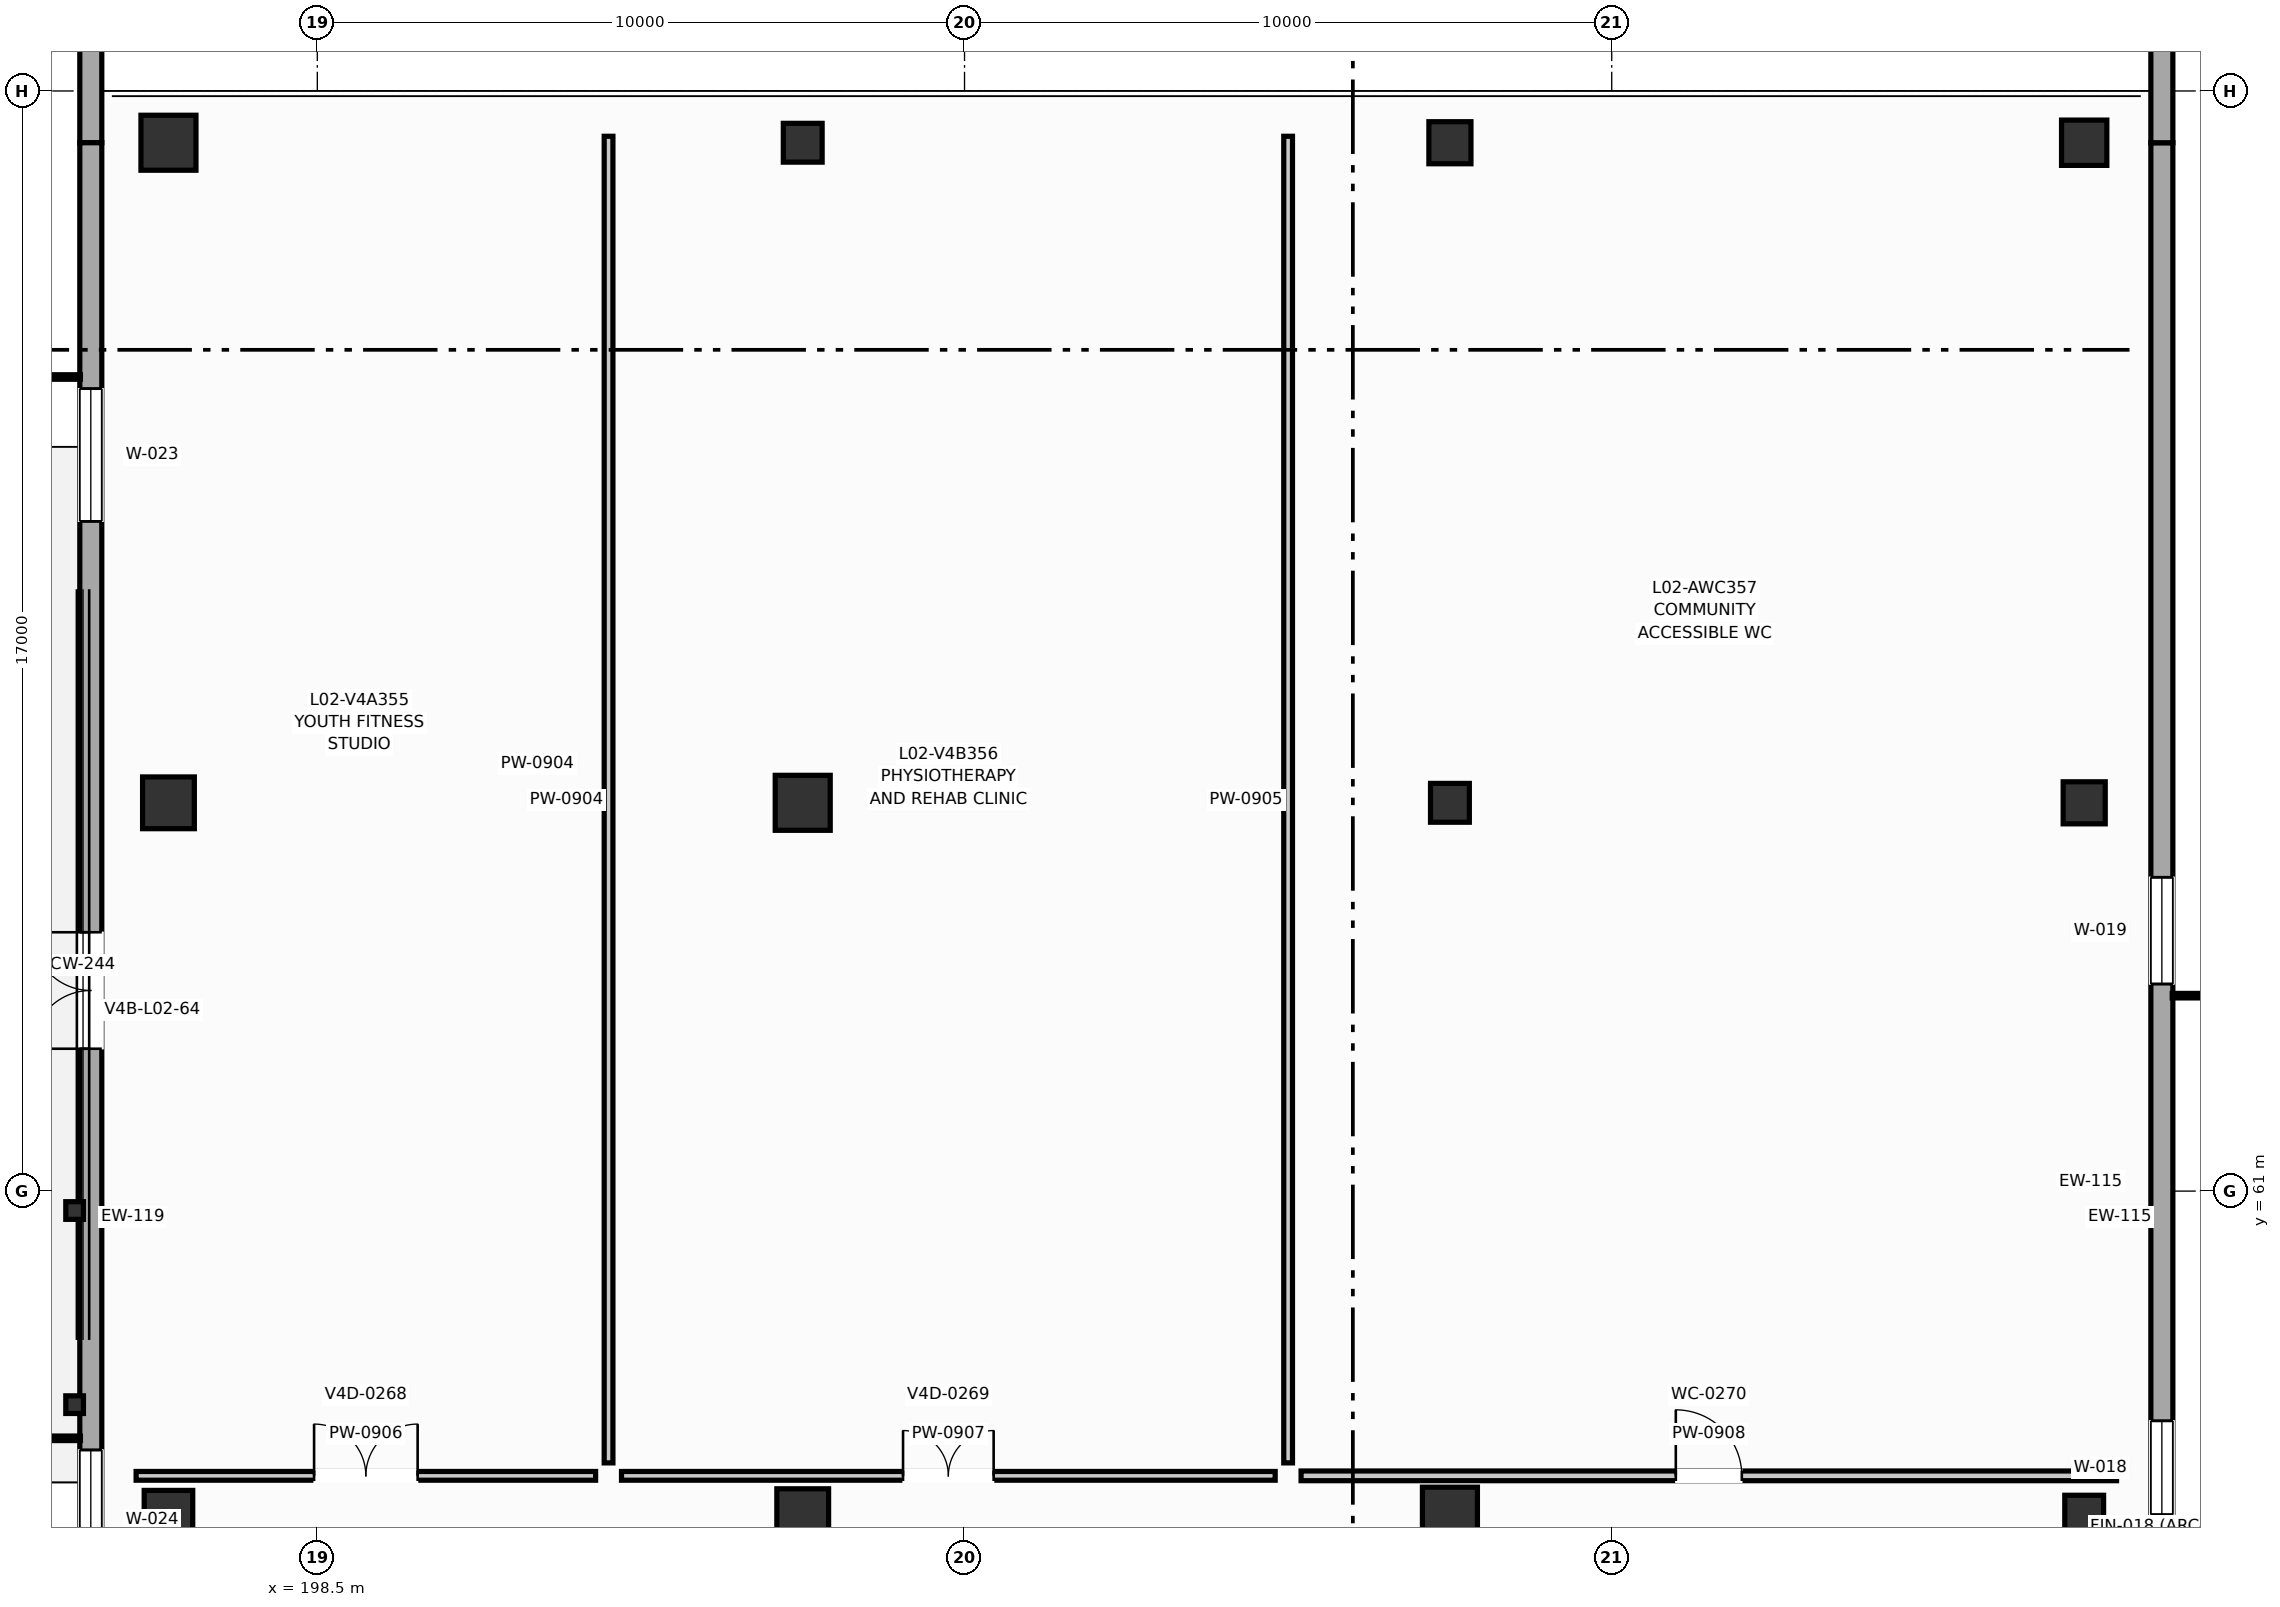
"""IFC4 building model, lengths in metres.
Left out: names, types, materials, properties, quantities, classifications, styles, units other than length and angle.
Written with IfcOpenShell. Run it as: python <this file> out.ifc"""

import sys

from ifc_helpers import new_model, si_unit, direction, frame, frame_2d, origin, origin_2d, place, context, subcontext, project, spatial, rectangle, hollow_circle, extrude, element, fill, save


model = new_model("IFC4")
c1 = context("Model", 3, precision=1e-05, world=origin(), true_north=direction((0.0, 1.0)))
c2 = subcontext(c1, "Body", "Model", "MODEL_VIEW")
j1 = project(units=[si_unit("LENGTHUNIT", "METRE"), si_unit("PLANEANGLEUNIT", "RADIAN")], contexts=[c1])
p1 = place(None, origin())
s1 = spatial("IfcSite", under=j1, at=p1, CompositionType="ELEMENT")
p2 = place(p1, origin())
s2 = spatial("IfcBuilding", under=s1, at=p2, CompositionType="ELEMENT")
p3 = place(p2, frame((0.0, 0.0, 9.0)))
s3 = spatial("IfcBuildingStorey", under=s2, at=p3, CompositionType="ELEMENT", Elevation=9.0)
p4 = place(p3, frame((196.2, 56.0, 0.0), z_axis=(0.0, 0.0, 1.0), x_axis=(1.0, 0.0, 0.0)))
e1 = element("IfcColumn", 1, at=p4, inside=s3, PredefinedType="COLUMN", context=c2, shape_type="SweptSolid", body=[
    extrude(rectangle(XDim=0.75, YDim=0.75, at=origin_2d()), origin(), (0.0, 0.0, 1.0), 4.5),
])
p5 = place(p3, frame((196.2, 67.0, 0.0), z_axis=(0.0, 0.0, 1.0), x_axis=(1.0, 0.0, 0.0)))
e2 = element("IfcColumn", 2, at=p5, inside=s3, PredefinedType="COLUMN", context=c2, shape_type="SweptSolid", body=[
    extrude(rectangle(XDim=0.8, YDim=0.8, at=origin_2d()), origin(), (0.0, 0.0, 1.0), 4.5),
])
p6 = place(p3, frame((196.2, 77.2, 0.0), z_axis=(0.0, 0.0, 1.0), x_axis=(1.0, 0.0, 0.0)))
e3 = element("IfcColumn", 3, at=p6, inside=s3, PredefinedType="COLUMN", context=c2, shape_type="SweptSolid", body=[
    extrude(rectangle(XDim=0.85, YDim=0.85, at=origin_2d()), origin(), (0.0, 0.0, 1.0), 4.5),
])
p7 = place(p3, frame((206.0, 56.0, 0.0), z_axis=(0.0, 0.0, 1.0), x_axis=(1.0, 0.0, 0.0)))
e4 = element("IfcColumn", 4, at=p7, inside=s3, PredefinedType="COLUMN", context=c2, shape_type="SweptSolid", body=[
    extrude(rectangle(XDim=0.8, YDim=0.8, at=origin_2d()), origin(), (0.0, 0.0, 1.0), 4.5),
])
p8 = place(p3, frame((206.0, 67.0, 0.0), z_axis=(0.0, 0.0, 1.0), x_axis=(1.0, 0.0, 0.0)))
e5 = element("IfcColumn", 5, at=p8, inside=s3, PredefinedType="COLUMN", context=c2, shape_type="SweptSolid", body=[
    extrude(rectangle(XDim=0.85, YDim=0.85, at=origin_2d()), origin(), (0.0, 0.0, 1.0), 4.5),
])
p9 = place(p3, frame((206.0, 77.2, 0.0), z_axis=(0.0, 0.0, 1.0), x_axis=(1.0, 0.0, 0.0)))
e6 = element("IfcColumn", 6, at=p9, inside=s3, PredefinedType="COLUMN", context=c2, shape_type="SweptSolid", body=[
    extrude(rectangle(XDim=0.6, YDim=0.6, at=origin_2d()), origin(), (0.0, 0.0, 1.0), 4.5),
])
p10 = place(p3, frame((216.0, 56.0, 0.0), z_axis=(0.0, 0.0, 1.0), x_axis=(1.0, 0.0, 0.0)))
e7 = element("IfcColumn", 7, at=p10, inside=s3, PredefinedType="COLUMN", context=c2, shape_type="SweptSolid", body=[
    extrude(rectangle(XDim=0.85, YDim=0.85, at=origin_2d()), origin(), (0.0, 0.0, 1.0), 4.5),
])
p11 = place(p3, frame((216.0, 67.0, 0.0), z_axis=(0.0, 0.0, 1.0), x_axis=(1.0, 0.0, 0.0)))
e8 = element("IfcColumn", 8, at=p11, inside=s3, PredefinedType="COLUMN", context=c2, shape_type="SweptSolid", body=[
    extrude(rectangle(XDim=0.6, YDim=0.6, at=origin_2d()), origin(), (0.0, 0.0, 1.0), 4.5),
])
p12 = place(p3, frame((216.0, 77.2, 0.0), z_axis=(0.0, 0.0, 1.0), x_axis=(1.0, 0.0, 0.0)))
e9 = element("IfcColumn", 9, at=p12, inside=s3, PredefinedType="COLUMN", context=c2, shape_type="SweptSolid", body=[
    extrude(rectangle(XDim=0.65, YDim=0.65, at=origin_2d()), origin(), (0.0, 0.0, 1.0), 4.5),
])
p13 = place(p3, frame((225.8, 56.0, 0.0), z_axis=(0.0, 0.0, 1.0), x_axis=(1.0, 0.0, 0.0)))
e10 = element("IfcColumn", 10, at=p13, inside=s3, PredefinedType="COLUMN", context=c2, shape_type="SweptSolid", body=[
    extrude(rectangle(XDim=0.6, YDim=0.6, at=origin_2d()), origin(), (0.0, 0.0, 1.0), 4.5),
])
p14 = place(p3, frame((225.8, 67.0, 0.0), z_axis=(0.0, 0.0, 1.0), x_axis=(1.0, 0.0, 0.0)))
e11 = element("IfcColumn", 11, at=p14, inside=s3, PredefinedType="COLUMN", context=c2, shape_type="SweptSolid", body=[
    extrude(rectangle(XDim=0.65, YDim=0.65, at=origin_2d()), origin(), (0.0, 0.0, 1.0), 4.5),
])
p15 = place(p3, frame((225.8, 77.2, 0.0), z_axis=(0.0, 0.0, 1.0), x_axis=(1.0, 0.0, 0.0)))
e12 = element("IfcColumn", 12, at=p15, inside=s3, PredefinedType="COLUMN", context=c2, shape_type="SweptSolid", body=[
    extrude(rectangle(XDim=0.7, YDim=0.7, at=origin_2d()), origin(), (0.0, 0.0, 1.0), 4.5),
])
for number, where, z_axis, x_axis in (
    (13, (194.75, 57.7, 0.0), (0.0, 0.0, 1.0), (1.0, 0.0, 0.0)),
    (14, (194.75, 60.7, 0.0), (0.0, 0.0, 1.0), (1.0, 0.0, 0.0)),
):
    element("IfcColumn", number, at=place(p3, frame(where, z_axis=z_axis, x_axis=x_axis)), inside=s3, PredefinedType="COLUMN", context=c2, shape_type="SweptSolid", body=[
        extrude(hollow_circle(Radius=0.136, WallThickness=0.012, at=origin_2d()), origin(), (0.0, 0.0, 1.0), 3.475),
    ])
p16 = place(p3, frame((227.0, 44.0, 0.0), z_axis=(0.0, 0.0, 1.0), x_axis=(0.0, 1.0, 0.0)))
e15 = element("IfcWall", 15, at=p16, inside=s3, PredefinedType="SOLIDWALL", context=c2, shape_type="SweptSolid", body=[
    extrude(rectangle(XDim=33.2, YDim=0.34, at=frame_2d((16.6, 0.0))), origin(), (0.0, 0.0, 1.0), 3.55),
])
p17 = place(p16, frame((3.8, 0.0, 0.85)))
e16 = element("IfcOpeningElement", 16, at=p17, cuts=e15, PredefinedType="OPENING", context=c2, shape_type="SweptSolid", body=[
    extrude(rectangle(XDim=1.3, YDim=1.9, at=frame_2d((0.65, 0.95))), frame((0.0, 0.18, 0.0), z_axis=(0.0, -1.0, 0.0), x_axis=(1.0, 0.0, 0.0)), (0.0, 0.0, 1.0), 0.36),
])
p18 = place(p16, frame((12.0, 0.0, 0.85)))
e17 = element("IfcOpeningElement", 17, at=p18, cuts=e15, PredefinedType="OPENING", context=c2, shape_type="SweptSolid", body=[
    extrude(rectangle(XDim=1.45, YDim=2.0, at=frame_2d((0.725, 1.0))), frame((0.0, 0.18, 0.0), z_axis=(0.0, -1.0, 0.0), x_axis=(1.0, 0.0, 0.0)), (0.0, 0.0, 1.0), 0.36),
])
p19 = place(p16, frame((20.2, 0.0, 0.85)))
e18 = element("IfcOpeningElement", 18, at=p19, cuts=e15, PredefinedType="OPENING", context=c2, shape_type="SweptSolid", body=[
    extrude(rectangle(XDim=1.65, YDim=2.1, at=frame_2d((0.825, 1.05))), frame((0.0, 0.18, 0.0), z_axis=(0.0, -1.0, 0.0), x_axis=(1.0, 0.0, 0.0)), (0.0, 0.0, 1.0), 0.36),
])
p20 = place(p3, frame((227.0, 77.2, 0.0), z_axis=(0.0, 0.0, 1.0), x_axis=(0.0, 1.0, 0.0)))
e19 = element("IfcWall", 19, at=p20, inside=s3, PredefinedType="SOLIDWALL", context=c2, shape_type="SweptSolid", body=[
    extrude(rectangle(XDim=34.8, YDim=0.34, at=frame_2d((17.4, 0.0))), origin(), (0.0, 0.0, 1.0), 4.5),
])
p21 = place(p20, frame((3.8, 0.0, 0.85)))
e20 = element("IfcOpeningElement", 20, at=p21, cuts=e19, PredefinedType="OPENING", context=c2, shape_type="SweptSolid", body=[
    extrude(rectangle(XDim=1.75, YDim=2.15, at=frame_2d((0.875, 1.075))), frame((0.0, 0.18, 0.0), z_axis=(0.0, -1.0, 0.0), x_axis=(1.0, 0.0, 0.0)), (0.0, 0.0, 1.0), 0.36),
])
p22 = place(p20, frame((12.0, 0.0, 0.85)))
e21 = element("IfcOpeningElement", 21, at=p22, cuts=e19, PredefinedType="OPENING", context=c2, shape_type="SweptSolid", body=[
    extrude(rectangle(XDim=1.85, YDim=2.2, at=frame_2d((0.925, 1.1))), frame((0.0, 0.18, 0.0), z_axis=(0.0, -1.0, 0.0), x_axis=(1.0, 0.0, 0.0)), (0.0, 0.0, 1.0), 0.36),
])
p23 = place(p20, frame((20.2, 0.0, 0.85)))
e22 = element("IfcOpeningElement", 22, at=p23, cuts=e19, PredefinedType="OPENING", context=c2, shape_type="SweptSolid", body=[
    extrude(rectangle(XDim=1.95, YDim=2.25, at=frame_2d((0.975, 1.125))), frame((0.0, 0.18, 0.0), z_axis=(0.0, -1.0, 0.0), x_axis=(1.0, 0.0, 0.0)), (0.0, 0.0, 1.0), 0.36),
])
p24 = place(p3, frame((195.0, 112.0, 0.0), z_axis=(0.0, 0.0, 1.0), x_axis=(0.0, -1.0, 0.0)))
e23 = element("IfcWall", 23, at=p24, inside=s3, PredefinedType="SOLIDWALL", context=c2, shape_type="SweptSolid", body=[
    extrude(rectangle(XDim=34.8, YDim=0.34, at=frame_2d((17.4, 0.0))), origin(), (0.0, 0.0, 1.0), 4.5),
])
p25 = place(p3, frame((195.0, 77.2, 0.0), z_axis=(0.0, 0.0, 1.0), x_axis=(0.0, -1.0, 0.0)))
e24 = element("IfcWall", 24, at=p25, inside=s3, PredefinedType="SOLIDWALL", context=c2, shape_type="SweptSolid", body=[
    extrude(rectangle(XDim=33.2, YDim=0.34, at=frame_2d((16.6, 0.0))), origin(), (0.0, 0.0, 1.0), 3.55),
])
p26 = place(p25, frame((12.2, 0.0, 0.0)))
e25 = element("IfcOpeningElement", 25, at=p26, cuts=e24, PredefinedType="OPENING", context=c2, shape_type="SweptSolid", body=[
    extrude(rectangle(XDim=1.8, YDim=2.35, at=frame_2d((0.9, 1.175))), frame((0.0, 0.18, 0.0), z_axis=(0.0, -1.0, 0.0), x_axis=(1.0, 0.0, 0.0)), (0.0, 0.0, 1.0), 0.36),
])
p27 = place(p25, frame((3.8, 0.0, 0.85)))
e26 = element("IfcOpeningElement", 26, at=p27, cuts=e24, PredefinedType="OPENING", context=c2, shape_type="SweptSolid", body=[
    extrude(rectangle(XDim=2.05, YDim=2.3, at=frame_2d((1.025, 1.15))), frame((0.0, 0.18, 0.0), z_axis=(0.0, -1.0, 0.0), x_axis=(1.0, 0.0, 0.0)), (0.0, 0.0, 1.0), 0.36),
])
p28 = place(p25, frame((20.2, 0.0, 0.85)))
e27 = element("IfcOpeningElement", 27, at=p28, cuts=e24, PredefinedType="OPENING", context=c2, shape_type="SweptSolid", body=[
    extrude(rectangle(XDim=2.15, YDim=2.35, at=frame_2d((1.075, 1.175))), frame((0.0, 0.18, 0.0), z_axis=(0.0, -1.0, 0.0), x_axis=(1.0, 0.0, 0.0)), (0.0, 0.0, 1.0), 0.36),
])
for number, where, z_axis, x_axis in (
    (28, (203.0, 56.8, 0.0), (0.0, 0.0, 1.0), (0.0, 1.0, 0.0)),
    (29, (213.5, 56.8, 0.0), (0.0, 0.0, 1.0), (0.0, 1.0, 0.0)),
):
    element("IfcWall", number, at=place(p3, frame(where, z_axis=z_axis, x_axis=x_axis)), inside=s3, PredefinedType="PARTITIONING", context=c2, shape_type="SweptSolid", body=[
        extrude(rectangle(XDim=20.5, YDim=0.135, at=frame_2d((10.25, 0.0))), origin(), (0.0, 0.0, 1.0), 3.22),
    ])
p29 = place(p3, frame((195.7, 56.6, 0.0), z_axis=(0.0, 0.0, 1.0), x_axis=(1.0, 0.0, 0.0)))
e30 = element("IfcWall", 30, at=p29, inside=s3, PredefinedType="PARTITIONING", context=c2, shape_type="SweptSolid", body=[
    extrude(rectangle(XDim=7.1, YDim=0.135, at=frame_2d((3.55, 0.0))), origin(), (0.0, 0.0, 1.0), 3.22),
])
p30 = place(p29, frame((2.75, 0.0, 0.0)))
e31 = element("IfcOpeningElement", 31, at=p30, cuts=e30, PredefinedType="OPENING", context=c2, shape_type="SweptSolid", body=[
    extrude(rectangle(XDim=1.6, YDim=2.25, at=frame_2d((0.8, 1.125))), frame((0.0, 0.077, 0.0), z_axis=(0.0, -1.0, 0.0), x_axis=(1.0, 0.0, 0.0)), (0.0, 0.0, 1.0), 0.155),
])
p31 = place(p3, frame((203.2, 56.6, 0.0), z_axis=(0.0, 0.0, 1.0), x_axis=(1.0, 0.0, 0.0)))
e32 = element("IfcWall", 32, at=p31, inside=s3, PredefinedType="PARTITIONING", context=c2, shape_type="SweptSolid", body=[
    extrude(rectangle(XDim=10.1, YDim=0.135, at=frame_2d((5.05, 0.0))), origin(), (0.0, 0.0, 1.0), 3.22),
])
p32 = place(p31, frame((4.35, 0.0, 0.0)))
e33 = element("IfcOpeningElement", 33, at=p32, cuts=e32, PredefinedType="OPENING", context=c2, shape_type="SweptSolid", body=[
    extrude(rectangle(XDim=1.4, YDim=2.2, at=frame_2d((0.7, 1.1))), frame((0.0, 0.077, 0.0), z_axis=(0.0, -1.0, 0.0), x_axis=(1.0, 0.0, 0.0)), (0.0, 0.0, 1.0), 0.155),
])
p33 = place(p3, frame((213.7, 56.6, 0.0), z_axis=(0.0, 0.0, 1.0), x_axis=(1.0, 0.0, 0.0)))
e34 = element("IfcWall", 34, at=p33, inside=s3, PredefinedType="PARTITIONING", context=c2, shape_type="SweptSolid", body=[
    extrude(rectangle(XDim=12.6, YDim=0.15, at=frame_2d((6.3, 0.0))), origin(), (0.0, 0.0, 1.0), 3.22),
])
p34 = place(p33, frame((5.79, 0.0, 0.0)))
e35 = element("IfcOpeningElement", 35, at=p34, cuts=e34, PredefinedType="OPENING", context=c2, shape_type="SweptSolid", body=[
    extrude(rectangle(XDim=1.02, YDim=2.15, at=frame_2d((0.51, 1.075))), frame((0.0, 0.085, 0.0), z_axis=(0.0, -1.0, 0.0), x_axis=(1.0, 0.0, 0.0)), (0.0, 0.0, 1.0), 0.17),
])
p35 = place(p18, origin())
e36 = element("IfcWindow", 36, at=p35, inside=s3, PartitioningType="SINGLE_PANEL", PredefinedType="WINDOW", context=c2, shape_type="SweptSolid", body=[
    extrude(rectangle(XDim=1.45, YDim=2.0, at=frame_2d((0.725, 1.0))), frame((0.0, 0.03, 0.0), z_axis=(0.0, -1.0, 0.0), x_axis=(1.0, 0.0, 0.0)), (0.0, 0.0, 1.0), 0.06),
])
fill(e17, e36)
p36 = place(p19, origin())
e37 = element("IfcWindow", 37, at=p36, inside=s3, PartitioningType="SINGLE_PANEL", PredefinedType="WINDOW", context=c2, shape_type="SweptSolid", body=[
    extrude(rectangle(XDim=1.65, YDim=2.1, at=frame_2d((0.825, 1.05))), frame((0.0, 0.03, 0.0), z_axis=(0.0, -1.0, 0.0), x_axis=(1.0, 0.0, 0.0)), (0.0, 0.0, 1.0), 0.06),
])
fill(e18, e37)
p37 = place(p26, frame((1.8, 0.0, 0.0), z_axis=(0.0, 0.0, 1.0), x_axis=(-1.0, 0.0, 0.0)))
e38 = element("IfcDoor", 38, at=p37, inside=s3, OperationType="DOUBLE_DOOR_SINGLE_SWING", PredefinedType="DOOR", context=c2, shape_type="SweptSolid", body=[
    extrude(rectangle(XDim=1.8, YDim=2.35, at=frame_2d((0.9, 1.175))), frame((0.0, 0.025, 0.0), z_axis=(0.0, -1.0, 0.0), x_axis=(1.0, 0.0, 0.0)), (0.0, 0.0, 1.0), 0.05),
])
fill(e25, e38)
p38 = place(p27, origin())
e39 = element("IfcWindow", 39, at=p38, inside=s3, PartitioningType="SINGLE_PANEL", PredefinedType="WINDOW", context=c2, shape_type="SweptSolid", body=[
    extrude(rectangle(XDim=2.05, YDim=2.3, at=frame_2d((1.025, 1.15))), frame((0.0, 0.03, 0.0), z_axis=(0.0, -1.0, 0.0), x_axis=(1.0, 0.0, 0.0)), (0.0, 0.0, 1.0), 0.06),
])
fill(e26, e39)
p39 = place(p28, origin())
e40 = element("IfcWindow", 40, at=p39, inside=s3, PartitioningType="SINGLE_PANEL", PredefinedType="WINDOW", context=c2, shape_type="SweptSolid", body=[
    extrude(rectangle(XDim=2.15, YDim=2.35, at=frame_2d((1.075, 1.175))), frame((0.0, 0.03, 0.0), z_axis=(0.0, -1.0, 0.0), x_axis=(1.0, 0.0, 0.0)), (0.0, 0.0, 1.0), 0.06),
])
fill(e27, e40)
p40 = place(p30, origin())
e41 = element("IfcDoor", 41, at=p40, inside=s3, OperationType="DOUBLE_DOOR_SINGLE_SWING", PredefinedType="DOOR", context=c2, shape_type="SweptSolid", body=[
    extrude(rectangle(XDim=1.6, YDim=2.25, at=frame_2d((0.8, 1.125))), frame((0.0, 0.025, 0.0), z_axis=(0.0, -1.0, 0.0), x_axis=(1.0, 0.0, 0.0)), (0.0, 0.0, 1.0), 0.05),
])
fill(e31, e41)
p41 = place(p32, origin())
e42 = element("IfcDoor", 42, at=p41, inside=s3, OperationType="DOUBLE_DOOR_SINGLE_SWING", PredefinedType="DOOR", context=c2, shape_type="SweptSolid", body=[
    extrude(rectangle(XDim=1.4, YDim=2.2, at=frame_2d((0.7, 1.1))), frame((0.0, 0.025, 0.0), z_axis=(0.0, -1.0, 0.0), x_axis=(1.0, 0.0, 0.0)), (0.0, 0.0, 1.0), 0.05),
])
fill(e33, e42)
p42 = place(p34, origin())
e43 = element("IfcDoor", 43, at=p42, inside=s3, OperationType="SINGLE_SWING_LEFT", PredefinedType="DOOR", context=c2, shape_type="SweptSolid", body=[
    extrude(rectangle(XDim=1.02, YDim=2.15, at=frame_2d((0.51, 1.075))), frame((0.0, 0.025, 0.0), z_axis=(0.0, -1.0, 0.0), x_axis=(1.0, 0.0, 0.0)), (0.0, 0.0, 1.0), 0.05),
])
fill(e35, e43)
save(model, sys.argv[1])
